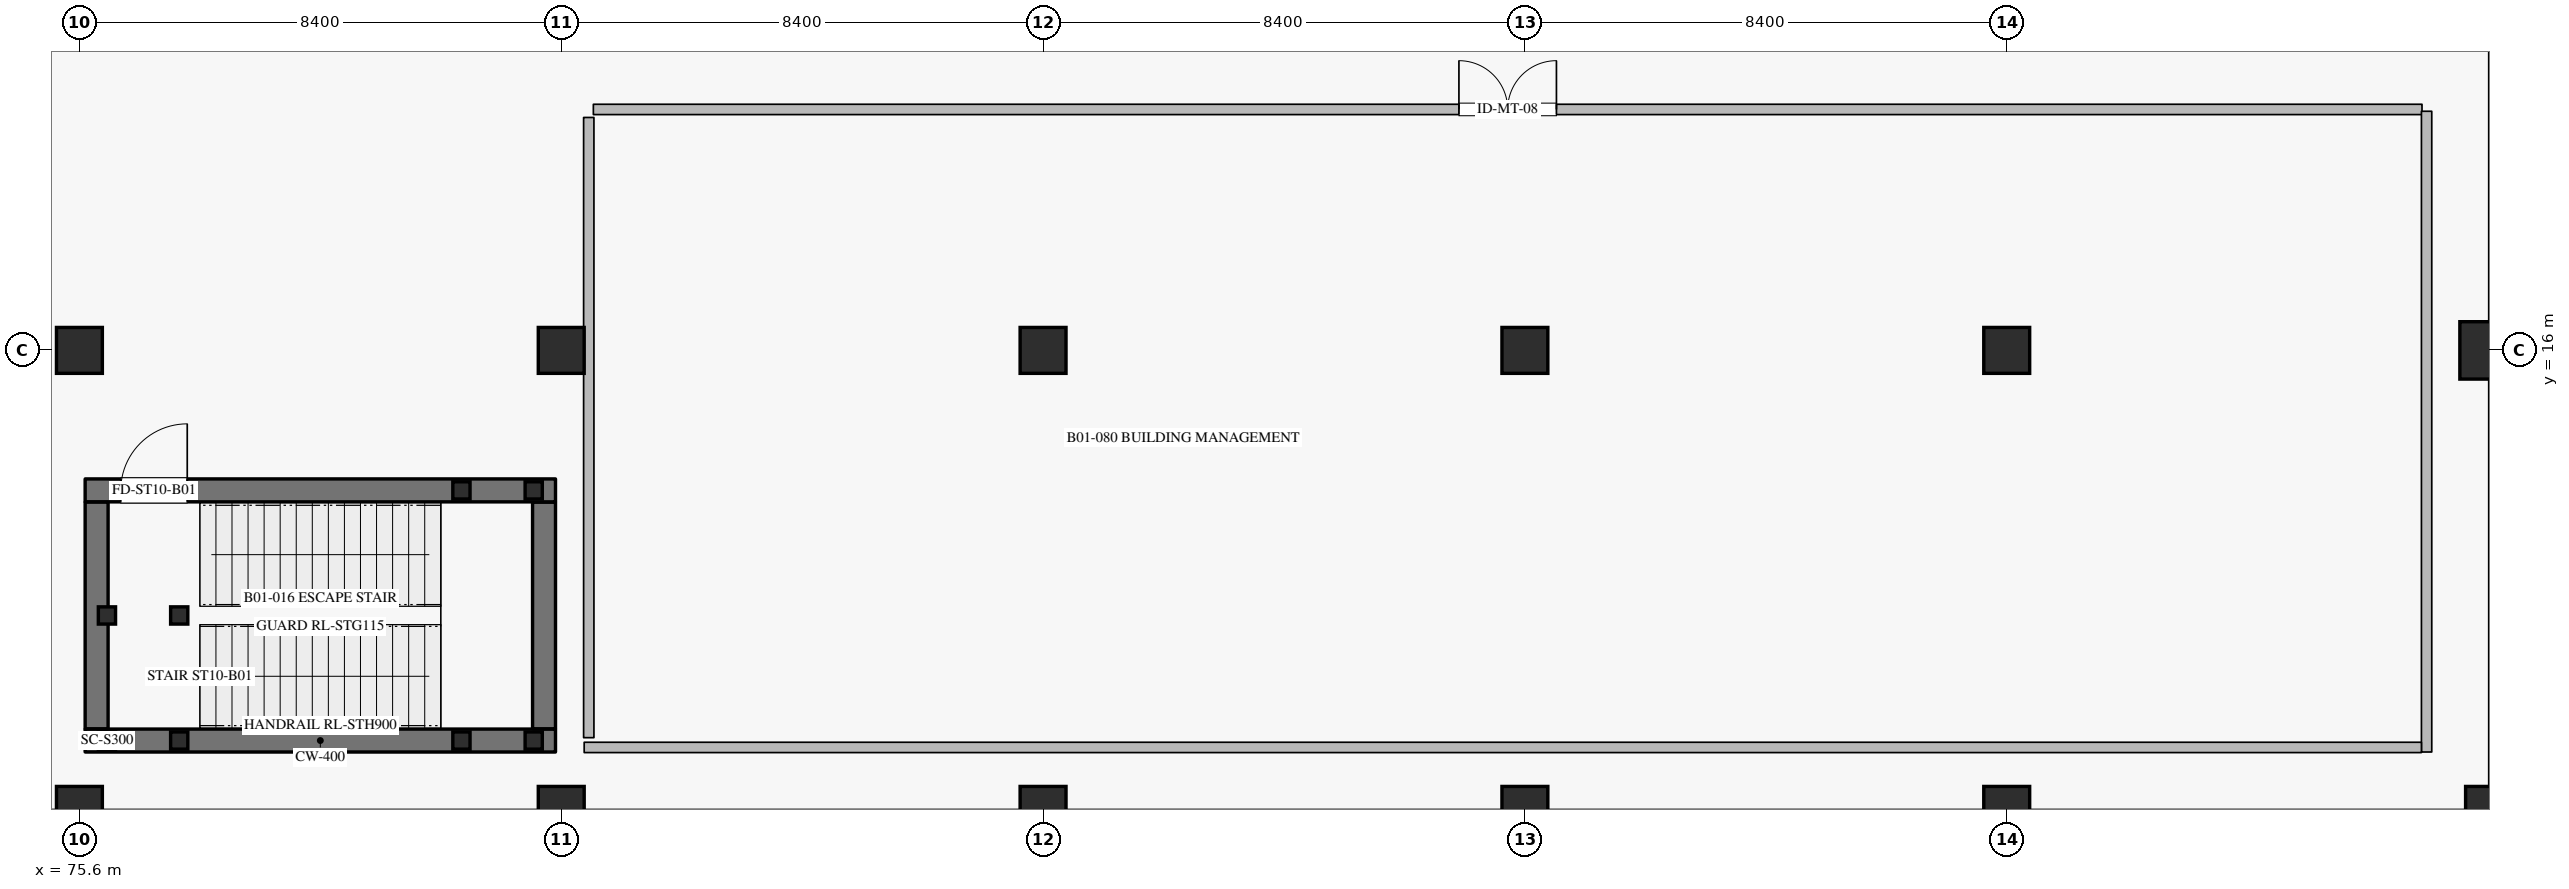
"""IFC4 building model, lengths in metres.
Left out: names, types, materials, properties, quantities, classifications, styles, units other than length and angle.
Written with IfcOpenShell. Run it as: python <this file> out.ifc"""

import sys

from ifc_helpers import new_model, si_unit, direction, frame, frame_2d, origin, origin_2d, place, context, subcontext, project, spatial, rectangle, hollow_rectangle, extrude, element, fill, save


model = new_model("IFC4")
c1 = context("Model", 3, precision=1e-05, world=origin(), true_north=direction((0.0, 1.0)))
c2 = subcontext(c1, "Body", "Model", "MODEL_VIEW")
j1 = project(units=[si_unit("LENGTHUNIT", "METRE"), si_unit("PLANEANGLEUNIT", "RADIAN")], contexts=[c1])
p1 = place(None, origin())
s1 = spatial("IfcSite", under=j1, at=p1, CompositionType="ELEMENT")
p2 = place(p1, origin())
s2 = spatial("IfcBuilding", under=s1, at=p2, CompositionType="ELEMENT")
p3 = place(p2, frame((0.0, 0.0, -5.4)))
s3 = spatial("IfcBuildingStorey", under=s2, at=p3, CompositionType="ELEMENT", Elevation=-5.4)
for number, where, z_axis, x_axis in (
    (1, (75.6, 8.0, 0.0), (0.0, 0.0, 1.0), (1.0, 0.0, 0.0)),
    (2, (75.6, 16.0, 0.0), (0.0, 0.0, 1.0), (1.0, 0.0, 0.0)),
    (3, (84.0, 8.0, 0.0), (0.0, 0.0, 1.0), (1.0, 0.0, 0.0)),
    (4, (84.0, 16.0, 0.0), (0.0, 0.0, 1.0), (1.0, 0.0, 0.0)),
    (5, (92.4, 8.0, 0.0), (0.0, 0.0, 1.0), (1.0, 0.0, 0.0)),
    (6, (92.4, 16.0, 0.0), (0.0, 0.0, 1.0), (1.0, 0.0, 0.0)),
    (7, (100.8, 8.0, 0.0), (0.0, 0.0, 1.0), (1.0, 0.0, 0.0)),
    (8, (100.8, 16.0, 0.0), (0.0, 0.0, 1.0), (1.0, 0.0, 0.0)),
    (9, (109.2, 8.0, 0.0), (0.0, 0.0, 1.0), (1.0, 0.0, 0.0)),
    (10, (109.2, 16.0, 0.0), (0.0, 0.0, 1.0), (1.0, 0.0, 0.0)),
    (11, (117.6, 8.0, 0.0), (0.0, 0.0, 1.0), (1.0, 0.0, 0.0)),
):
    element("IfcColumn", number, at=place(p3, frame(where, z_axis=z_axis, x_axis=x_axis)), inside=s3, PredefinedType="COLUMN", context=c2, shape_type="SweptSolid", body=[
        extrude(rectangle(XDim=0.8, YDim=0.8, at=origin_2d()), origin(), (0.0, 0.0, 1.0), 5.4),
    ])
p4 = place(p3, frame((117.6, 16.0, 0.0), z_axis=(0.0, 0.0, 1.0), x_axis=(1.0, 0.0, 0.0)))
e12 = element("IfcColumn", 12, at=p4, inside=s3, PredefinedType="COLUMN", context=c2, shape_type="SweptSolid", body=[
    extrude(rectangle(XDim=1.0, YDim=1.0, at=origin_2d()), origin(), (0.0, 0.0, 1.0), 5.4),
])
p5 = place(p3, frame((75.7, 9.2, 0.0), z_axis=(0.0, 0.0, 1.0), x_axis=(1.0, 0.0, 0.0)))
e13 = element("IfcWall", 13, at=p5, inside=s3, PredefinedType="SHEAR", context=c2, shape_type="SweptSolid", body=[
    extrude(rectangle(XDim=8.2, YDim=0.4, at=frame_2d((4.1, 0.0))), origin(), (0.0, 0.0, 1.0), 4.995),
])
p6 = place(p3, frame((83.7, 9.405, 0.0), z_axis=(0.0, 0.0, 1.0), x_axis=(0.0, 1.0, 0.0)))
e14 = element("IfcWall", 14, at=p6, inside=s3, PredefinedType="SHEAR", context=c2, shape_type="SweptSolid", body=[
    extrude(rectangle(XDim=3.95, YDim=0.4, at=frame_2d((1.975, 0.0))), origin(), (0.0, 0.0, 1.0), 4.995),
])
p7 = place(p3, frame((75.7, 13.56, 0.0), z_axis=(0.0, 0.0, 1.0), x_axis=(1.0, 0.0, 0.0)))
e15 = element("IfcWall", 15, at=p7, inside=s3, PredefinedType="SHEAR", context=c2, shape_type="SweptSolid", body=[
    extrude(rectangle(XDim=8.2, YDim=0.4, at=frame_2d((4.1, 0.0))), origin(), (0.0, 0.0, 1.0), 4.995),
])
p8 = place(p7, frame((0.62, 0.0, 0.0)))
e16 = element("IfcOpeningElement", 16, at=p8, cuts=e15, PredefinedType="OPENING", context=c2, shape_type="SweptSolid", body=[
    extrude(rectangle(XDim=1.16, YDim=2.2, at=frame_2d((0.58, 1.1))), frame((0.0, 0.21, 0.0), z_axis=(0.0, -1.0, 0.0), x_axis=(1.0, 0.0, 0.0)), (0.0, 0.0, 1.0), 0.42),
])
p9 = place(p3, frame((75.9, 9.405, 0.0), z_axis=(0.0, 0.0, 1.0), x_axis=(0.0, 1.0, 0.0)))
e17 = element("IfcWall", 17, at=p9, inside=s3, PredefinedType="SHEAR", context=c2, shape_type="SweptSolid", body=[
    extrude(rectangle(XDim=3.95, YDim=0.4, at=frame_2d((1.975, 0.0))), origin(), (0.0, 0.0, 1.0), 4.995),
])
for number, where, z_axis, x_axis in (
    (18, (76.08, 9.2, 0.0), (0.0, 0.0, 1.0), (1.0, 0.0, 0.0)),
    (19, (76.08, 11.38, 0.0), (0.0, 0.0, 1.0), (1.0, 0.0, 0.0)),
    (20, (77.34, 9.2, 0.0), (0.0, 0.0, 1.0), (1.0, 0.0, 0.0)),
    (21, (77.34, 11.38, 0.0), (0.0, 0.0, 1.0), (1.0, 0.0, 0.0)),
):
    element("IfcColumn", number, at=place(p3, frame(where, z_axis=z_axis, x_axis=x_axis)), inside=s3, PredefinedType="COLUMN", context=c2, shape_type="SweptSolid", body=[
        extrude(hollow_rectangle(XDim=0.3, YDim=0.3, WallThickness=0.012, at=origin_2d()), origin(), (0.0, 0.0, 1.0), 5.22),
    ])
for number, where, z_axis, x_axis in (
    (22, (82.26, 9.2, 0.0), (0.0, 0.0, 1.0), (1.0, 0.0, 0.0)),
    (23, (82.26, 13.56, 0.0), (0.0, 0.0, 1.0), (1.0, 0.0, 0.0)),
    (24, (83.52, 9.2, 0.0), (0.0, 0.0, 1.0), (1.0, 0.0, 0.0)),
    (25, (83.52, 13.56, 0.0), (0.0, 0.0, 1.0), (1.0, 0.0, 0.0)),
):
    element("IfcColumn", number, at=place(p3, frame(where, z_axis=z_axis, x_axis=x_axis)), inside=s3, PredefinedType="COLUMN", context=c2, shape_type="SweptSolid", body=[
        extrude(hollow_rectangle(XDim=0.3, YDim=0.3, WallThickness=0.012, at=origin_2d()), origin(), (0.0, 0.0, 1.0), 2.52),
    ])
p10 = place(p3, frame((84.56, 20.2, 0.0), z_axis=(0.0, 0.0, 1.0), x_axis=(1.0, 0.0, 0.0)))
e26 = element("IfcWall", 26, at=p10, inside=s3, PredefinedType="PARTITIONING", context=c2, shape_type="SweptSolid", body=[
    extrude(rectangle(XDim=31.88, YDim=0.18, at=frame_2d((15.94, 0.0))), origin(), (0.0, 0.0, 1.0), 4.995),
])
p11 = place(p10, frame((15.09, 0.0, 0.0)))
e27 = element("IfcOpeningElement", 27, at=p11, cuts=e26, PredefinedType="OPENING", context=c2, shape_type="SweptSolid", body=[
    extrude(rectangle(XDim=1.7, YDim=2.3, at=frame_2d((0.85, 1.15))), frame((0.0, 0.1, 0.0), z_axis=(0.0, -1.0, 0.0), x_axis=(1.0, 0.0, 0.0)), (0.0, 0.0, 1.0), 0.2),
])
p12 = place(p3, frame((84.48, 9.25, 0.0), z_axis=(0.0, 0.0, 1.0), x_axis=(0.0, 1.0, 0.0)))
e28 = element("IfcWall", 28, at=p12, inside=s3, PredefinedType="PARTITIONING", context=c2, shape_type="SweptSolid", body=[
    extrude(rectangle(XDim=10.81, YDim=0.18, at=frame_2d((5.405, 0.0))), origin(), (0.0, 0.0, 1.0), 4.995),
])
p13 = place(p3, frame((116.52, 9.0, 0.0), z_axis=(0.0, 0.0, 1.0), x_axis=(0.0, 1.0, 0.0)))
e29 = element("IfcWall", 29, at=p13, inside=s3, PredefinedType="PARTITIONING", context=c2, shape_type="SweptSolid", body=[
    extrude(rectangle(XDim=11.168, YDim=0.18, at=frame_2d((5.584, 0.0))), origin(), (0.0, 0.0, 1.0), 4.995),
])
p14 = place(p3, frame((84.4, 9.08, 0.0), z_axis=(0.0, 0.0, 1.0), x_axis=(1.0, 0.0, 0.0)))
e30 = element("IfcWall", 30, at=p14, inside=s3, PredefinedType="PARTITIONING", context=c2, shape_type="SweptSolid", body=[
    extrude(rectangle(XDim=32.03, YDim=0.18, at=frame_2d((16.015, 0.0))), origin(), (0.0, 0.0, 1.0), 4.995),
])
p15 = place(p8, origin())
e31 = element("IfcDoor", 31, at=p15, inside=s3, OperationType="SINGLE_SWING_RIGHT", PredefinedType="DOOR", context=c2, shape_type="SweptSolid", body=[
    extrude(rectangle(XDim=1.16, YDim=2.2, at=frame_2d((0.58, 1.1))), frame((0.0, 0.025, 0.0), z_axis=(0.0, -1.0, 0.0), x_axis=(1.0, 0.0, 0.0)), (0.0, 0.0, 1.0), 0.05),
])
fill(e16, e31)
p16 = place(p11, origin())
e32 = element("IfcDoor", 32, at=p16, inside=s3, OperationType="DOUBLE_DOOR_SINGLE_SWING", PredefinedType="DOOR", context=c2, shape_type="SweptSolid", body=[
    extrude(rectangle(XDim=1.7, YDim=2.3, at=frame_2d((0.85, 1.15))), frame((0.0, 0.025, 0.0), z_axis=(0.0, -1.0, 0.0), x_axis=(1.0, 0.0, 0.0)), (0.0, 0.0, 1.0), 0.05),
])
fill(e27, e32)
save(model, sys.argv[1])
